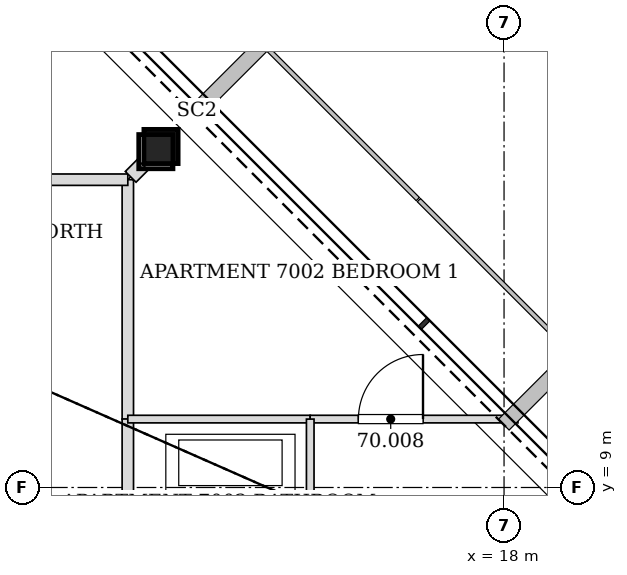
"""IFC4 building model, lengths in metres.
Left out: names, types, materials, properties, quantities, classifications, styles, units other than length and angle.
Written with IfcOpenShell. Run it as: python <this file> out.ifc"""

import sys

from ifc_helpers import new_model, si_unit, direction, frame, frame_2d, origin, origin_2d, place, context, subcontext, project, spatial, rectangle, hollow_rectangle, extrude, element, fill, save


model = new_model("IFC4")
c1 = context("Model", 3, precision=1e-05, world=origin(), true_north=direction((0.0, 1.0)))
c2 = subcontext(c1, "Body", "Model", "MODEL_VIEW")
j1 = project(units=[si_unit("LENGTHUNIT", "METRE"), si_unit("PLANEANGLEUNIT", "RADIAN")], contexts=[c1])
p1 = place(None, origin())
s1 = spatial("IfcSite", under=j1, at=p1, CompositionType="ELEMENT")
p2 = place(p1, origin())
s2 = spatial("IfcBuilding", under=s1, at=p2, CompositionType="ELEMENT")
p3 = place(p2, frame((0.0, 0.0, 287.8)))
s3 = spatial("IfcBuildingStorey", under=s2, at=p3, CompositionType="ELEMENT", Elevation=287.8)
p4 = place(p3, frame((13.487, 13.487, 0.0), z_axis=(-0.01995470925, -0.01995470925, 0.999601730269), x_axis=(0.707106781187, -0.707106781187, 0.0)))
e1 = element("IfcColumn", 1, at=p4, inside=s3, PredefinedType="COLUMN", context=c2, shape_type="SweptSolid", body=[
    extrude(hollow_rectangle(XDim=0.45, YDim=0.45, WallThickness=0.02, at=origin_2d()), origin(), (0.0, 0.0, 1.0), 3.401),
])
p5 = place(p3, frame((13.05, 9.899, 0.0), z_axis=(0.0, 0.0, 1.0), x_axis=(0.0, 1.0, 0.0)))
e2 = element("IfcWall", 2, at=p5, inside=s3, PredefinedType="PARTITIONING", context=c2, shape_type="SweptSolid", body=[
    extrude(rectangle(XDim=3.151, YDim=0.15, at=frame_2d((1.576, 0.0))), origin(), (0.0, 0.0, 1.0), 2.497),
])
p6 = place(p3, frame((13.05, 7.699, 0.0), z_axis=(0.0, 0.0, 1.0), x_axis=(0.0, 1.0, 0.0)))
e3 = element("IfcWall", 3, at=p6, inside=s3, PredefinedType="PARTITIONING", context=c2, shape_type="SweptSolid", body=[
    extrude(rectangle(XDim=2.202, YDim=0.15, at=frame_2d((1.101, 0.0))), origin(), (0.0, 0.0, 1.0), 2.497),
])
p7 = place(p3, frame((13.05, 13.05, 0.0), z_axis=(0.0, 0.0, 1.0), x_axis=(-1.0, 0.0, 0.0)))
e4 = element("IfcWall", 4, at=p7, inside=s3, PredefinedType="PARTITIONING", context=c2, shape_type="SweptSolid", body=[
    extrude(rectangle(XDim=4.101, YDim=0.15, at=frame_2d((2.051, 0.0))), origin(), (0.0, 0.0, 1.0), 2.497),
])
p8 = place(p3, frame((13.05, 9.9, 0.0), z_axis=(0.0, 0.0, 1.0), x_axis=(1.0, 0.0, 0.0)))
e5 = element("IfcWall", 5, at=p8, inside=s3, PredefinedType="PARTITIONING", context=c2, shape_type="SweptSolid", body=[
    extrude(rectangle(XDim=2.401, YDim=0.1, at=frame_2d((1.2, 0.0))), origin(), (0.0, 0.0, 1.0), 2.497),
])
p9 = place(p3, frame((15.449, 9.9, 0.0), z_axis=(0.0, 0.0, 1.0), x_axis=(1.0, 0.0, 0.0)))
e6 = element("IfcWall", 6, at=p9, inside=s3, PredefinedType="PARTITIONING", context=c2, shape_type="SweptSolid", body=[
    extrude(rectangle(XDim=2.734, YDim=0.1, at=frame_2d((1.367, 0.0))), origin(), (0.0, 0.0, 1.0), 2.74),
])
p10 = place(p9, frame((0.635, 0.0, 0.0)))
e7 = element("IfcOpeningElement", 7, at=p10, cuts=e6, PredefinedType="OPENING", context=c2, shape_type="SweptSolid", body=[
    extrude(rectangle(XDim=0.85, YDim=2.1, at=frame_2d((0.425, 1.05))), frame((0.0, 0.06, 0.0), z_axis=(0.0, -1.0, 0.0), x_axis=(1.0, 0.0, 0.0)), (0.0, 0.0, 1.0), 0.12),
])
p11 = place(p3, frame((13.246, 13.246, 0.0), z_axis=(0.0, 0.0, 1.0), x_axis=(-0.707106781187, -0.707106781187, 0.0)))
e8 = element("IfcWall", 8, at=p11, inside=s3, PredefinedType="PARTITIONING", context=c2, shape_type="SweptSolid", body=[
    extrude(rectangle(XDim=0.224, YDim=0.2, at=frame_2d((0.112, 0.0))), origin(), (0.0, 0.0, 1.0), 2.591),
])
p12 = place(p3, frame((15.45, 7.7, 0.0), z_axis=(0.0, 0.0, 1.0), x_axis=(0.0, 1.0, 0.0)))
e9 = element("IfcWall", 9, at=p12, inside=s3, PredefinedType="PARTITIONING", context=c2, shape_type="SweptSolid", body=[
    extrude(rectangle(XDim=2.2, YDim=0.1, at=frame_2d((1.1, 0.0))), origin(), (0.0, 0.0, 1.0), 2.497),
])
p13 = place(p10, origin())
e10 = element("IfcDoor", 10, at=p13, inside=s3, OperationType="SINGLE_SWING_RIGHT", PredefinedType="DOOR", context=c2, shape_type="SweptSolid", body=[
    extrude(rectangle(XDim=0.85, YDim=2.1, at=frame_2d((0.425, 1.05))), frame((0.0, 0.025, 0.0), z_axis=(0.0, -1.0, 0.0), x_axis=(1.0, 0.0, 0.0)), (0.0, 0.0, 1.0), 0.05),
])
fill(e7, e10)
save(model, sys.argv[1])
